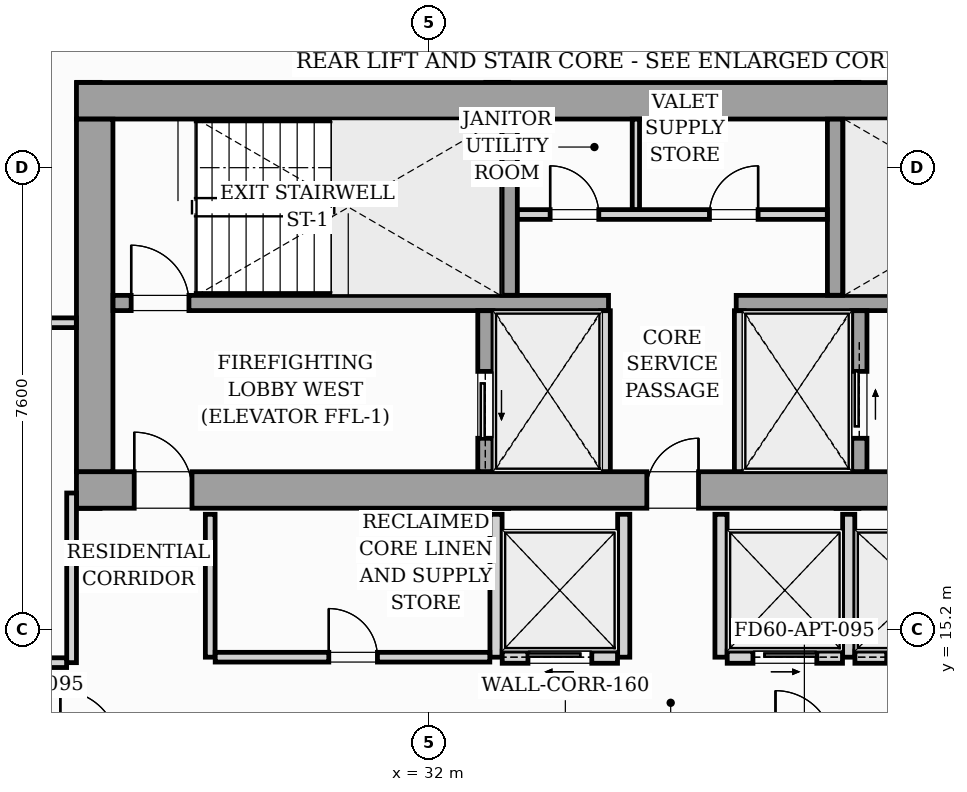
"""IFC4 building model, lengths in metres.
Left out: names, types, materials, properties, quantities, classifications, styles, units other than length and angle.
Written with IfcOpenShell. Run it as: python <this file> out.ifc"""

import sys

from ifc_helpers import new_model, si_unit, direction, frame, frame_2d, origin, origin_2d, place, context, subcontext, project, spatial, rectangle, i_section, extrude, source, transform, mapped, element, fill, save


model = new_model("IFC4")
c1 = context("Model", 3, precision=1e-05, world=origin(), true_north=direction((0.0, 1.0)))
c2 = subcontext(c1, "Body", "Model", "MODEL_VIEW")
j1 = project(units=[si_unit("LENGTHUNIT", "METRE"), si_unit("PLANEANGLEUNIT", "RADIAN")], contexts=[c1])
p1 = place(None, origin())
s1 = spatial("IfcSite", under=j1, at=p1, CompositionType="ELEMENT")
p2 = place(p1, origin())
s2 = spatial("IfcBuilding", under=s1, at=p2, CompositionType="ELEMENT")
p3 = place(p2, frame((0.0, 0.0, 182.6)))
s3 = spatial("IfcBuildingStorey", under=s2, at=p3, CompositionType="ELEMENT", Elevation=182.6)
m1 = source(origin(), c2, "Body", "SweptSolid", [
    extrude(i_section(OverallWidth=0.416, OverallDepth=0.446, WebThickness=0.039, FlangeThickness=0.063, FilletRadius=0.018, at=origin_2d()), origin(), (0.0, 0.0, 1.0), 3.196),
])
for number, where, z_axis, x_axis in (
    (1, (26.4, 17.4, 0.002), (0.0, 0.0, 1.0), (1.0, 0.0, 0.0)),
    (2, (33.12, 17.4, 0.002), (0.0, 0.0, 1.0), (1.0, 0.0, 0.0)),
    (3, (38.88, 17.4, 0.002), (0.0, 0.0, 1.0), (1.0, 0.0, 0.0)),
    (4, (26.4, 24.0, 0.002), (0.0, 0.0, 1.0), (1.0, 0.0, 0.0)),
    (5, (33.12, 24.0, 0.002), (0.0, 0.0, 1.0), (1.0, 0.0, 0.0)),
    (6, (38.88, 24.0, 0.002), (0.0, 0.0, 1.0), (1.0, 0.0, 0.0)),
):
    element("IfcColumn", number, at=place(p3, frame(where, z_axis=z_axis, x_axis=x_axis)), inside=s3, PredefinedType="PILASTER", context=c2, shape_type="MappedRepresentation", body=[
        mapped(m1, transform((0.0, 0.0, 0.0), scale=1.0)),
    ])
p4 = place(p3, frame((15.437, 24.324, 0.0), z_axis=(0.0, 0.0, 1.0), x_axis=(0.995395627913, 0.095851676732, 0.0)))
e7 = element("IfcWall", 7, at=p4, inside=s3, PredefinedType="STANDARD", context=c2, shape_type="SweptSolid", body=[
    extrude(rectangle(XDim=16.1, YDim=0.26, at=frame_2d((8.05, 0.0))), origin(), (0.0, 0.0, 1.0), 2.94),
])
p5 = place(p4, frame((2.543, 0.0, 0.0)))
e8 = element("IfcOpeningElement", 8, at=p5, cuts=e7, PredefinedType="OPENING", context=c2, shape_type="SweptSolid", body=[
    extrude(rectangle(XDim=1.8, YDim=2.06, at=frame_2d((0.9, 1.03))), frame((0.0, 0.14, 0.0), z_axis=(0.0, -1.0, 0.0), x_axis=(1.0, 0.0, 0.0)), (0.0, 0.0, 1.0), 0.28),
])
p6 = place(p4, frame((4.75, 0.0, 0.65)))
e9 = element("IfcOpeningElement", 9, at=p6, cuts=e7, PredefinedType="OPENING", context=c2, shape_type="SweptSolid", body=[
    extrude(rectangle(XDim=1.6, YDim=1.5, at=frame_2d((0.8, 0.75))), frame((0.0, 0.14, 0.0), z_axis=(0.0, -1.0, 0.0), x_axis=(1.0, 0.0, 0.0)), (0.0, 0.0, 1.0), 0.28),
])
p7 = place(p3, frame((26.2, 17.5, 0.0), z_axis=(0.0, 0.0, 1.0), x_axis=(1.0, 0.0, 0.0)))
e10 = element("IfcWall", 10, at=p7, inside=s3, PredefinedType="SHEAR", context=c2, shape_type="SweptSolid", body=[
    extrude(rectangle(XDim=19.6, YDim=0.6, at=frame_2d((9.8, 0.0))), origin(), (0.0, 0.0, 1.0), 3.2),
])
p8 = place(p7, frame((0.95, 0.0, 0.0)))
e11 = element("IfcOpeningElement", 11, at=p8, cuts=e10, PredefinedType="OPENING", context=c2, shape_type="SweptSolid", body=[
    extrude(rectangle(XDim=0.95, YDim=2.06, at=frame_2d((0.475, 1.03))), frame((0.0, 0.31, 0.0), z_axis=(0.0, -1.0, 0.0), x_axis=(1.0, 0.0, 0.0)), (0.0, 0.0, 1.0), 0.62),
])
p9 = place(p7, frame((9.38, 0.0, 0.0)))
e12 = element("IfcOpeningElement", 12, at=p9, cuts=e10, PredefinedType="OPENING", context=c2, shape_type="SweptSolid", body=[
    extrude(rectangle(XDim=0.85, YDim=2.0, at=frame_2d((0.425, 1.0))), frame((0.0, 0.31, 0.0), z_axis=(0.0, -1.0, 0.0), x_axis=(1.0, 0.0, 0.0)), (0.0, 0.0, 1.0), 0.62),
])
p10 = place(p7, frame((17.55, 0.0, 0.0)))
e13 = element("IfcOpeningElement", 13, at=p10, cuts=e10, PredefinedType="OPENING", context=c2, shape_type="SweptSolid", body=[
    extrude(rectangle(XDim=0.95, YDim=2.06, at=frame_2d((0.475, 1.03))), frame((0.0, 0.31, 0.0), z_axis=(0.0, -1.0, 0.0), x_axis=(1.0, 0.0, 0.0)), (0.0, 0.0, 1.0), 0.62),
])
p11 = place(p3, frame((26.2, 23.9, 0.0), z_axis=(0.0, 0.0, 1.0), x_axis=(1.0, 0.0, 0.0)))
e14 = element("IfcWall", 14, at=p11, inside=s3, PredefinedType="SHEAR", context=c2, shape_type="SweptSolid", body=[
    extrude(rectangle(XDim=19.6, YDim=0.6, at=frame_2d((9.8, 0.0))), origin(), (0.0, 0.0, 1.0), 3.2),
])
p12 = place(p3, frame((26.5, 17.802, 0.0), z_axis=(0.0, 0.0, 1.0), x_axis=(0.0, 1.0, 0.0)))
e15 = element("IfcWall", 15, at=p12, inside=s3, PredefinedType="SHEAR", context=c2, shape_type="SweptSolid", body=[
    extrude(rectangle(XDim=5.796, YDim=0.6, at=frame_2d((2.898, 0.0))), origin(), (0.0, 0.0, 1.0), 3.2),
])
p13 = place(p3, frame((26.802, 20.575, 0.0), z_axis=(0.0, 0.0, 1.0), x_axis=(1.0, 0.0, 0.0)))
e16 = element("IfcWall", 16, at=p13, inside=s3, PredefinedType="SOLIDWALL", context=c2, shape_type="SweptSolid", body=[
    extrude(rectangle(XDim=8.148, YDim=0.25, at=frame_2d((4.074, 0.0))), origin(), (0.0, 0.0, 1.0), 3.2),
])
p14 = place(p13, frame((0.298, 0.0, 0.0)))
e17 = element("IfcOpeningElement", 17, at=p14, cuts=e16, PredefinedType="OPENING", context=c2, shape_type="SweptSolid", body=[
    extrude(rectangle(XDim=0.95, YDim=2.06, at=frame_2d((0.475, 1.03))), frame((0.0, 0.135, 0.0), z_axis=(0.0, -1.0, 0.0), x_axis=(1.0, 0.0, 0.0)), (0.0, 0.0, 1.0), 0.27),
])
p15 = place(p3, frame((37.05, 20.575, 0.0), z_axis=(0.0, 0.0, 1.0), x_axis=(1.0, 0.0, 0.0)))
e18 = element("IfcWall", 18, at=p15, inside=s3, PredefinedType="SOLIDWALL", context=c2, shape_type="SweptSolid", body=[
    extrude(rectangle(XDim=8.148, YDim=0.25, at=frame_2d((4.074, 0.0))), origin(), (0.0, 0.0, 1.0), 3.2),
])
p16 = place(p15, frame((6.6, 0.0, 0.0)))
e19 = element("IfcOpeningElement", 19, at=p16, cuts=e18, PredefinedType="OPENING", context=c2, shape_type="SweptSolid", body=[
    extrude(rectangle(XDim=0.95, YDim=2.06, at=frame_2d((0.475, 1.03))), frame((0.0, 0.135, 0.0), z_axis=(0.0, -1.0, 0.0), x_axis=(1.0, 0.0, 0.0)), (0.0, 0.0, 1.0), 0.27),
])
for number, where, z_axis, x_axis in (
    (20, (33.325, 20.702, 0.0), (0.0, 0.0, 1.0), (0.0, 1.0, 0.0)),
    (21, (38.675, 20.702, 0.0), (0.0, 0.0, 1.0), (0.0, 1.0, 0.0)),
):
    element("IfcWall", number, at=place(p3, frame(where, z_axis=z_axis, x_axis=x_axis)), inside=s3, PredefinedType="SOLIDWALL", context=c2, shape_type="SweptSolid", body=[
        extrude(rectangle(XDim=2.896, YDim=0.25, at=frame_2d((1.448, 0.0))), origin(), (0.0, 0.0, 1.0), 3.2),
    ])
p17 = place(p3, frame((32.925, 17.802, 0.0), z_axis=(0.0, 0.0, 1.0), x_axis=(0.0, 1.0, 0.0)))
e22 = element("IfcWall", 22, at=p17, inside=s3, PredefinedType="SOLIDWALL", context=c2, shape_type="SweptSolid", body=[
    extrude(rectangle(XDim=2.646, YDim=0.25, at=frame_2d((1.323, 0.0))), origin(), (0.0, 0.0, 1.0), 3.2),
])
p18 = place(p17, frame((0.548, 0.0, 0.0)))
e23 = element("IfcOpeningElement", 23, at=p18, cuts=e22, PredefinedType="OPENING", context=c2, shape_type="SweptSolid", body=[
    extrude(rectangle(XDim=1.1, YDim=2.08, at=frame_2d((0.55, 1.04))), frame((0.0, 0.135, 0.0), z_axis=(0.0, -1.0, 0.0), x_axis=(1.0, 0.0, 0.0)), (0.0, 0.0, 1.0), 0.27),
])
for number, where, z_axis, x_axis in (
    (24, (34.9, 17.802, 0.0), (0.0, 0.0, 1.0), (0.0, 1.0, 0.0)),
    (25, (37.1, 17.802, 0.0), (0.0, 0.0, 1.0), (0.0, 1.0, 0.0)),
):
    element("IfcWall", number, at=place(p3, frame(where, z_axis=z_axis, x_axis=x_axis)), inside=s3, PredefinedType="PARTITIONING", context=c2, shape_type="SweptSolid", body=[
        extrude(rectangle(XDim=2.646, YDim=0.16, at=frame_2d((1.323, 0.0))), origin(), (0.0, 0.0, 1.0), 2.94),
    ])
p19 = place(p3, frame((39.075, 17.802, 0.0), z_axis=(0.0, 0.0, 1.0), x_axis=(0.0, 1.0, 0.0)))
e26 = element("IfcWall", 26, at=p19, inside=s3, PredefinedType="SOLIDWALL", context=c2, shape_type="SweptSolid", body=[
    extrude(rectangle(XDim=2.646, YDim=0.25, at=frame_2d((1.323, 0.0))), origin(), (0.0, 0.0, 1.0), 3.2),
])
p20 = place(p19, frame((0.548, 0.0, 0.0)))
e27 = element("IfcOpeningElement", 27, at=p20, cuts=e26, PredefinedType="OPENING", context=c2, shape_type="SweptSolid", body=[
    extrude(rectangle(XDim=1.1, YDim=2.08, at=frame_2d((0.55, 1.04))), frame((0.0, 0.135, 0.0), z_axis=(0.0, -1.0, 0.0), x_axis=(1.0, 0.0, 0.0)), (0.0, 0.0, 1.0), 0.27),
])
p21 = place(p3, frame((33.452, 22.03, 0.0), z_axis=(0.0, 0.0, 1.0), x_axis=(1.0, 0.0, 0.0)))
e28 = element("IfcWall", 28, at=p21, inside=s3, PredefinedType="PARTITIONING", context=c2, shape_type="SweptSolid", body=[
    extrude(rectangle(XDim=5.096, YDim=0.16, at=frame_2d((2.548, 0.0))), origin(), (0.0, 0.0, 1.0), 2.94),
])
p22 = place(p21, frame((0.538, 0.0, 0.0)))
e29 = element("IfcOpeningElement", 29, at=p22, cuts=e28, PredefinedType="OPENING", context=c2, shape_type="SweptSolid", body=[
    extrude(rectangle(XDim=0.8, YDim=2.05, at=frame_2d((0.4, 1.025))), frame((0.0, 0.09, 0.0), z_axis=(0.0, -1.0, 0.0), x_axis=(1.0, 0.0, 0.0)), (0.0, 0.0, 1.0), 0.18),
])
p23 = place(p21, frame((3.158, 0.0, 0.0)))
e30 = element("IfcOpeningElement", 30, at=p23, cuts=e28, PredefinedType="OPENING", context=c2, shape_type="SweptSolid", body=[
    extrude(rectangle(XDim=0.8, YDim=2.05, at=frame_2d((0.4, 1.025))), frame((0.0, 0.09, 0.0), z_axis=(0.0, -1.0, 0.0), x_axis=(1.0, 0.0, 0.0)), (0.0, 0.0, 1.0), 0.18),
])
p24 = place(p3, frame((35.4, 22.112, 0.0), z_axis=(0.0, 0.0, 1.0), x_axis=(0.0, 1.0, 0.0)))
e31 = element("IfcWall", 31, at=p24, inside=s3, PredefinedType="PARTITIONING", context=c2, shape_type="SweptSolid", body=[
    extrude(rectangle(XDim=1.486, YDim=0.12, at=frame_2d((0.743, 0.0))), origin(), (0.0, 0.0, 1.0), 2.94),
])
p25 = place(p3, frame((28.4, 14.75, 0.0), z_axis=(0.0, 0.0, 1.0), x_axis=(0.0, 1.0, 0.0)))
e32 = element("IfcWall", 32, at=p25, inside=s3, PredefinedType="PARTITIONING", context=c2, shape_type="SweptSolid", body=[
    extrude(rectangle(XDim=2.35, YDim=0.16, at=frame_2d((1.175, 0.0))), origin(), (0.0, 0.0, 1.0), 2.94),
])
p26 = place(p3, frame((33.1, 14.75, 0.0), z_axis=(0.0, 0.0, 1.0), x_axis=(0.0, 1.0, 0.0)))
e33 = element("IfcWall", 33, at=p26, inside=s3, PredefinedType="PARTITIONING", context=c2, shape_type="SweptSolid", body=[
    extrude(rectangle(XDim=2.35, YDim=0.2, at=frame_2d((1.175, 0.0))), origin(), (0.0, 0.0, 1.0), 2.94),
])
p27 = place(p3, frame((28.482, 14.75, 0.0), z_axis=(0.0, 0.0, 1.0), x_axis=(1.0, 0.0, 0.0)))
e34 = element("IfcWall", 34, at=p27, inside=s3, PredefinedType="PARTITIONING", context=c2, shape_type="SweptSolid", body=[
    extrude(rectangle(XDim=4.516, YDim=0.16, at=frame_2d((2.258, 0.0))), origin(), (0.0, 0.0, 1.0), 2.94),
])
p28 = place(p27, frame((1.868, 0.0, 0.0)))
e35 = element("IfcOpeningElement", 35, at=p28, cuts=e34, PredefinedType="OPENING", context=c2, shape_type="SweptSolid", body=[
    extrude(rectangle(XDim=0.8, YDim=2.05, at=frame_2d((0.4, 1.025))), frame((0.0, 0.09, 0.0), z_axis=(0.0, -1.0, 0.0), x_axis=(1.0, 0.0, 0.0)), (0.0, 0.0, 1.0), 0.18),
])
p29 = place(p3, frame((35.2, 14.75, 0.0), z_axis=(0.0, 0.0, 1.0), x_axis=(0.0, 1.0, 0.0)))
e36 = element("IfcWall", 36, at=p29, inside=s3, PredefinedType="PARTITIONING", context=c2, shape_type="SweptSolid", body=[
    extrude(rectangle(XDim=2.35, YDim=0.2, at=frame_2d((1.175, 0.0))), origin(), (0.0, 0.0, 1.0), 2.94),
])
p30 = place(p3, frame((33.202, 14.75, 0.0), z_axis=(0.0, 0.0, 1.0), x_axis=(1.0, 0.0, 0.0)))
e37 = element("IfcWall", 37, at=p30, inside=s3, PredefinedType="PARTITIONING", context=c2, shape_type="SweptSolid", body=[
    extrude(rectangle(XDim=1.896, YDim=0.2, at=frame_2d((0.948, 0.0))), origin(), (0.0, 0.0, 1.0), 2.94),
])
p31 = place(p30, frame((0.423, 0.0, 0.0)))
e38 = element("IfcOpeningElement", 38, at=p31, cuts=e37, PredefinedType="OPENING", context=c2, shape_type="SweptSolid", body=[
    extrude(rectangle(XDim=1.05, YDim=2.08, at=frame_2d((0.525, 1.04))), frame((0.0, 0.11, 0.0), z_axis=(0.0, -1.0, 0.0), x_axis=(1.0, 0.0, 0.0)), (0.0, 0.0, 1.0), 0.22),
])
for number, where, z_axis, x_axis in (
    (39, (36.8, 14.75, 0.0), (0.0, 0.0, 1.0), (0.0, 1.0, 0.0)),
    (40, (38.9, 14.75, 0.0), (0.0, 0.0, 1.0), (0.0, 1.0, 0.0)),
):
    element("IfcWall", number, at=place(p3, frame(where, z_axis=z_axis, x_axis=x_axis)), inside=s3, PredefinedType="PARTITIONING", context=c2, shape_type="SweptSolid", body=[
        extrude(rectangle(XDim=2.35, YDim=0.2, at=frame_2d((1.175, 0.0))), origin(), (0.0, 0.0, 1.0), 2.94),
    ])
p32 = place(p3, frame((36.902, 14.75, 0.0), z_axis=(0.0, 0.0, 1.0), x_axis=(1.0, 0.0, 0.0)))
e41 = element("IfcWall", 41, at=p32, inside=s3, PredefinedType="PARTITIONING", context=c2, shape_type="SweptSolid", body=[
    extrude(rectangle(XDim=1.896, YDim=0.2, at=frame_2d((0.948, 0.0))), origin(), (0.0, 0.0, 1.0), 2.94),
])
p33 = place(p32, frame((0.423, 0.0, 0.0)))
e42 = element("IfcOpeningElement", 42, at=p33, cuts=e41, PredefinedType="OPENING", context=c2, shape_type="SweptSolid", body=[
    extrude(rectangle(XDim=1.05, YDim=2.08, at=frame_2d((0.525, 1.04))), frame((0.0, 0.11, 0.0), z_axis=(0.0, -1.0, 0.0), x_axis=(1.0, 0.0, 0.0)), (0.0, 0.0, 1.0), 0.22),
])
p34 = place(p3, frame((39.002, 14.75, 0.0), z_axis=(0.0, 0.0, 1.0), x_axis=(1.0, 0.0, 0.0)))
e43 = element("IfcWall", 43, at=p34, inside=s3, PredefinedType="PARTITIONING", context=c2, shape_type="SweptSolid", body=[
    extrude(rectangle(XDim=2.146, YDim=0.2, at=frame_2d((1.073, 0.0))), origin(), (0.0, 0.0, 1.0), 2.94),
])
p35 = place(p34, frame((0.523, 0.0, 0.0)))
e44 = element("IfcOpeningElement", 44, at=p35, cuts=e43, PredefinedType="OPENING", context=c2, shape_type="SweptSolid", body=[
    extrude(rectangle(XDim=1.05, YDim=2.08, at=frame_2d((0.525, 1.04))), frame((0.0, 0.11, 0.0), z_axis=(0.0, -1.0, 0.0), x_axis=(1.0, 0.0, 0.0)), (0.0, 0.0, 1.0), 0.22),
])
p36 = place(p3, frame((24.732, 20.25, 0.0), z_axis=(0.0, 0.0, 1.0), x_axis=(1.0, 0.0, 0.0)))
e45 = element("IfcWall", 45, at=p36, inside=s3, PredefinedType="PARTITIONING", context=c2, shape_type="SweptSolid", body=[
    extrude(rectangle(XDim=1.466, YDim=0.16, at=frame_2d((0.733, 0.0))), origin(), (0.0, 0.0, 1.0), 2.94),
])
p37 = place(p3, frame((26.12, 14.66, 0.0), z_axis=(0.0, 0.0, 1.0), x_axis=(0.0, 1.0, 0.0)))
e46 = element("IfcWall", 46, at=p37, inside=s3, PredefinedType="PARTITIONING", context=c2, shape_type="SweptSolid", body=[
    extrude(rectangle(XDim=2.79, YDim=0.16, at=frame_2d((1.395, 0.0))), origin(), (0.0, 0.0, 1.0), 2.94),
])
p38 = place(p3, frame((24.732, 14.66, 0.0), z_axis=(0.0, 0.0, 1.0), x_axis=(1.0, 0.0, 0.0)))
e47 = element("IfcWall", 47, at=p38, inside=s3, PredefinedType="PARTITIONING", context=c2, shape_type="SweptSolid", body=[
    extrude(rectangle(XDim=1.306, YDim=0.16, at=frame_2d((0.653, 0.0))), origin(), (0.0, 0.0, 1.0), 2.94),
])
m2 = source(origin(), c2, "Body", "SweptSolid", [
    extrude(rectangle(XDim=0.95, YDim=2.06, at=frame_2d((0.475, 1.03))), frame((0.0, 0.025, 0.0), z_axis=(0.0, -1.0, 0.0), x_axis=(1.0, 0.0, 0.0)), (0.0, 0.0, 1.0), 0.05),
])
p39 = place(p8, origin())
e48 = element("IfcDoor", 48, at=p39, inside=s3, OperationType="SINGLE_SWING_LEFT", PredefinedType="DOOR", context=c2, shape_type="MappedRepresentation", body=[
    mapped(m2, transform((0.0, 0.0, 0.0), scale=1.0)),
])
fill(e11, e48)
m3 = source(origin(), c2, "Body", "SweptSolid", [
    extrude(rectangle(XDim=0.85, YDim=2.0, at=frame_2d((0.425, 1.0))), frame((0.0, 0.025, 0.0), z_axis=(0.0, -1.0, 0.0), x_axis=(1.0, 0.0, 0.0)), (0.0, 0.0, 1.0), 0.05),
])
p40 = place(p9, origin())
e49 = element("IfcDoor", 49, at=p40, inside=s3, OperationType="SINGLE_SWING_RIGHT", PredefinedType="DOOR", context=c2, shape_type="MappedRepresentation", body=[
    mapped(m3, transform((0.0, 0.0, 0.0), scale=1.0)),
])
fill(e12, e49)
p41 = place(p14, origin())
e50 = element("IfcDoor", 50, at=p41, inside=s3, OperationType="SINGLE_SWING_LEFT", PredefinedType="DOOR", context=c2, shape_type="MappedRepresentation", body=[
    mapped(m2, transform((0.0, 0.0, 0.0), scale=1.0)),
])
fill(e17, e50)
m4 = source(origin(), c2, "Body", "SweptSolid", [
    extrude(rectangle(XDim=1.1, YDim=2.08, at=frame_2d((0.55, 1.04))), frame((0.0, 0.025, 0.0), z_axis=(0.0, -1.0, 0.0), x_axis=(1.0, 0.0, 0.0)), (0.0, 0.0, 1.0), 0.05),
])
p42 = place(p18, origin())
e51 = element("IfcDoor", 51, at=p42, inside=s3, OperationType="SLIDING_TO_LEFT", PredefinedType="DOOR", context=c2, shape_type="MappedRepresentation", body=[
    mapped(m4, transform((0.0, 0.0, 0.0), scale=1.0)),
])
fill(e23, e51)
p43 = place(p20, origin())
e52 = element("IfcDoor", 52, at=p43, inside=s3, OperationType="SLIDING_TO_RIGHT", PredefinedType="DOOR", context=c2, shape_type="MappedRepresentation", body=[
    mapped(m4, transform((0.0, 0.0, 0.0), scale=1.0)),
])
fill(e27, e52)
m5 = source(origin(), c2, "Body", "SweptSolid", [
    extrude(rectangle(XDim=0.8, YDim=2.05, at=frame_2d((0.4, 1.025))), frame((0.0, 0.025, 0.0), z_axis=(0.0, -1.0, 0.0), x_axis=(1.0, 0.0, 0.0)), (0.0, 0.0, 1.0), 0.05),
])
p44 = place(p22, origin())
e53 = element("IfcDoor", 53, at=p44, inside=s3, OperationType="SINGLE_SWING_LEFT", PredefinedType="DOOR", context=c2, shape_type="MappedRepresentation", body=[
    mapped(m5, transform((0.0, 0.0, 0.0), scale=1.0)),
])
fill(e29, e53)
p45 = place(p23, origin())
e54 = element("IfcDoor", 54, at=p45, inside=s3, OperationType="SINGLE_SWING_RIGHT", PredefinedType="DOOR", context=c2, shape_type="MappedRepresentation", body=[
    mapped(m5, transform((0.0, 0.0, 0.0), scale=1.0)),
])
fill(e30, e54)
p46 = place(p28, origin())
e55 = element("IfcDoor", 55, at=p46, inside=s3, OperationType="SINGLE_SWING_LEFT", PredefinedType="DOOR", context=c2, shape_type="MappedRepresentation", body=[
    mapped(m5, transform((0.0, 0.0, 0.0), scale=1.0)),
])
fill(e35, e55)
m6 = source(origin(), c2, "Body", "SweptSolid", [
    extrude(rectangle(XDim=1.05, YDim=2.08, at=frame_2d((0.525, 1.04))), frame((0.0, 0.025, 0.0), z_axis=(0.0, -1.0, 0.0), x_axis=(1.0, 0.0, 0.0)), (0.0, 0.0, 1.0), 0.05),
])
p47 = place(p31, origin())
e56 = element("IfcDoor", 56, at=p47, inside=s3, OperationType="SLIDING_TO_LEFT", PredefinedType="DOOR", context=c2, shape_type="MappedRepresentation", body=[
    mapped(m6, transform((0.0, 0.0, 0.0), scale=1.0)),
])
fill(e38, e56)
p48 = place(p33, origin())
e57 = element("IfcDoor", 57, at=p48, inside=s3, OperationType="SLIDING_TO_RIGHT", PredefinedType="DOOR", context=c2, shape_type="MappedRepresentation", body=[
    mapped(m6, transform((0.0, 0.0, 0.0), scale=1.0)),
])
fill(e42, e57)
p49 = place(p35, origin())
e58 = element("IfcDoor", 58, at=p49, inside=s3, OperationType="SLIDING_TO_LEFT", PredefinedType="DOOR", context=c2, shape_type="MappedRepresentation", body=[
    mapped(m6, transform((0.0, 0.0, 0.0), scale=1.0)),
])
fill(e44, e58)
save(model, sys.argv[1])
